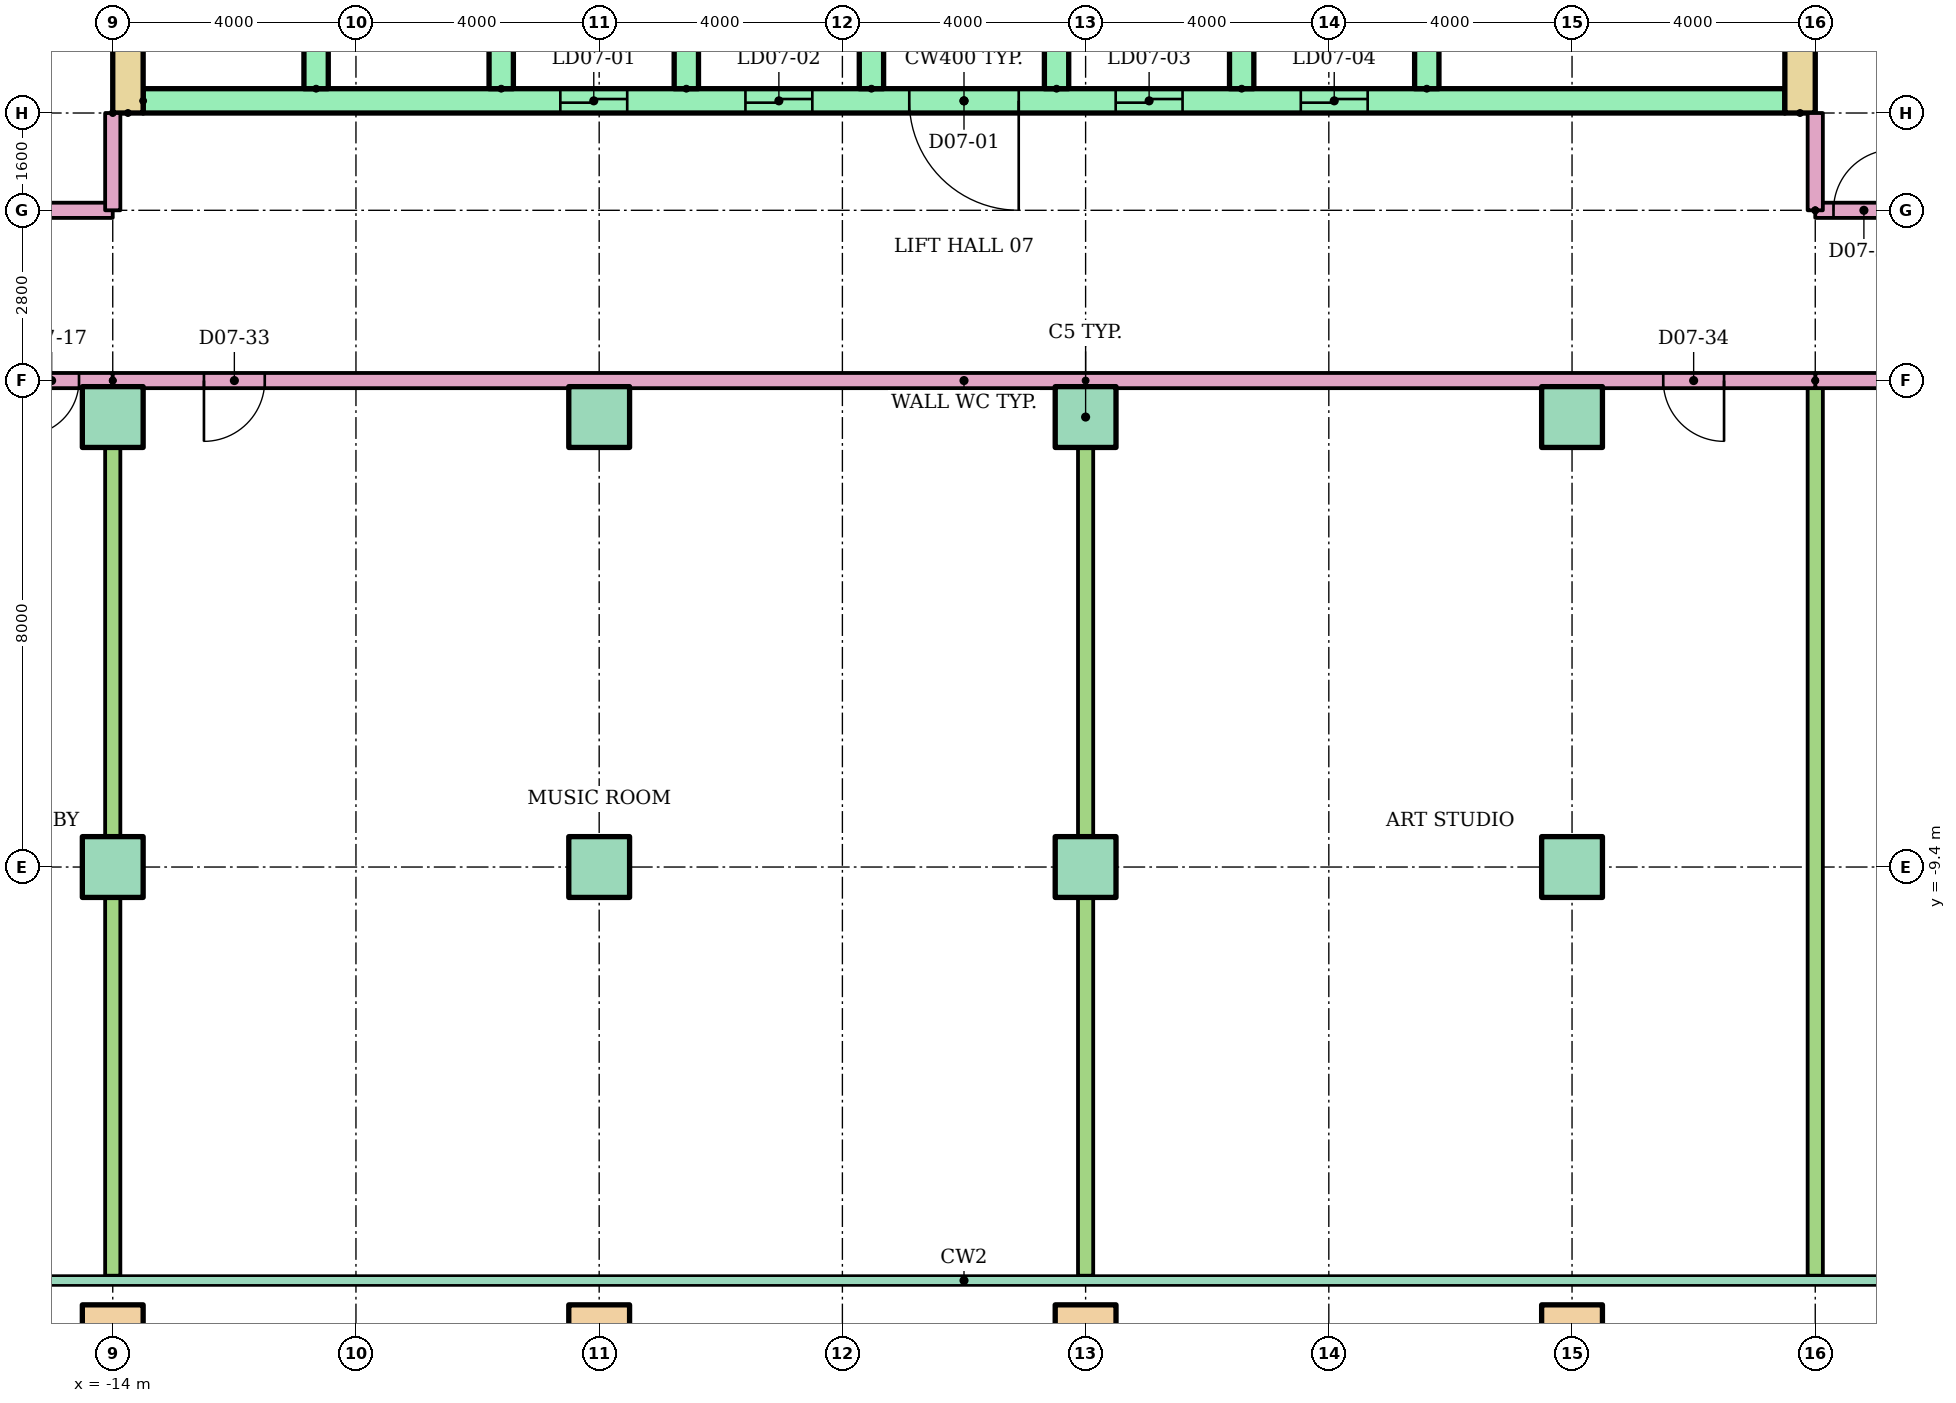
"""IFC4 building model, lengths in metres.
Left out: names, types, materials, properties, quantities, classifications, styles, units other than length and angle.
Written with IfcOpenShell. Run it as: python <this file> out.ifc"""

import sys

from ifc_helpers import new_model, si_unit, direction, frame, frame_2d, origin, origin_2d, place, context, subcontext, project, spatial, rectangle, hollow_rectangle, extrude, element, fill, save


model = new_model("IFC4")
c1 = context("Model", 3, precision=1e-05, world=origin(), true_north=direction((0.0, 1.0)))
c2 = subcontext(c1, "Body", "Model", "MODEL_VIEW")
j1 = project(units=[si_unit("LENGTHUNIT", "METRE"), si_unit("PLANEANGLEUNIT", "RADIAN")], contexts=[c1])
p1 = place(None, origin())
s1 = spatial("IfcSite", under=j1, at=p1, CompositionType="ELEMENT")
p2 = place(p1, origin())
s2 = spatial("IfcBuilding", under=s1, at=p2, CompositionType="ELEMENT")
p3 = place(p2, frame((0.0, 0.0, 29.9)))
s3 = spatial("IfcBuildingStorey", under=s2, at=p3, CompositionType="ELEMENT", Elevation=29.9)
for number, where in (
    (1, (-14.0, -17.1, 0.0)),
    (2, (-6.0, -17.1, 0.0)),
    (3, (2.0, -17.1, 0.0)),
    (4, (10.0, -17.1, 0.0)),
):
    element("IfcColumn", number, at=place(p3, frame(where)), inside=s3, PredefinedType="COLUMN", context=c2, shape_type="SweptSolid", body=[
        extrude(hollow_rectangle(XDim=1.0, YDim=1.0, WallThickness=0.05, at=origin_2d()), origin(), (0.0, 0.0, 1.0), 3.9),
    ])
for number, where in (
    (5, (-14.0, -9.4, 0.0)),
    (6, (-6.0, -9.4, 0.0)),
    (7, (2.0, -9.4, 0.0)),
    (8, (10.0, -9.4, 0.0)),
    (9, (-14.0, -2.0, 0.0)),
    (10, (-6.0, -2.0, 0.0)),
    (11, (2.0, -2.0, 0.0)),
    (12, (10.0, -2.0, 0.0)),
):
    element("IfcColumn", number, at=place(p3, frame(where)), inside=s3, PredefinedType="COLUMN", context=c2, shape_type="SweptSolid", body=[
        extrude(rectangle(XDim=1.0, YDim=1.0, at=origin_2d()), origin(), (0.0, 0.0, 1.0), 3.9),
    ])
for number, where, z_axis, x_axis in (
    (13, (-13.75, 3.0, 0.0), (0.0, 0.0, 1.0), (0.0, 1.0, 0.0)),
    (14, (13.75, 3.0, 0.0), (0.0, 0.0, 1.0), (0.0, 1.0, 0.0)),
):
    element("IfcWall", number, at=place(p3, frame(where, z_axis=z_axis, x_axis=x_axis)), inside=s3, PredefinedType="SHEAR", context=c2, shape_type="SweptSolid", body=[
        extrude(rectangle(XDim=17.0, YDim=0.5, at=frame_2d((8.5, 0.0))), origin(), (0.0, 0.0, 1.0), 3.6),
    ])
p4 = place(p3, frame((-13.5, 3.2, 0.0)))
e15 = element("IfcWall", 15, at=p4, inside=s3, PredefinedType="SHEAR", context=c2, shape_type="SweptSolid", body=[
    extrude(rectangle(XDim=27.0, YDim=0.4, at=frame_2d((13.5, 0.0))), origin(), (0.0, 0.0, 1.0), 3.6),
])
p5 = place(p4, frame((6.861, 0.0, 0.0)))
e16 = element("IfcOpeningElement", 16, at=p5, cuts=e15, PredefinedType="OPENING", context=c2, shape_type="SweptSolid", body=[
    extrude(rectangle(XDim=1.1, YDim=2.1, at=frame_2d((0.55, 1.05))), frame((0.0, 0.21, 0.0), z_axis=(0.0, -1.0, 0.0), x_axis=(1.0, 0.0, 0.0)), (0.0, 0.0, 1.0), 0.42),
])
p6 = place(p4, frame((9.906, 0.0, 0.0)))
e17 = element("IfcOpeningElement", 17, at=p6, cuts=e15, PredefinedType="OPENING", context=c2, shape_type="SweptSolid", body=[
    extrude(rectangle(XDim=1.1, YDim=2.1, at=frame_2d((0.55, 1.05))), frame((0.0, 0.21, 0.0), z_axis=(0.0, -1.0, 0.0), x_axis=(1.0, 0.0, 0.0)), (0.0, 0.0, 1.0), 0.42),
])
p7 = place(p4, frame((15.994, 0.0, 0.0)))
e18 = element("IfcOpeningElement", 18, at=p7, cuts=e15, PredefinedType="OPENING", context=c2, shape_type="SweptSolid", body=[
    extrude(rectangle(XDim=1.1, YDim=2.1, at=frame_2d((0.55, 1.05))), frame((0.0, 0.21, 0.0), z_axis=(0.0, -1.0, 0.0), x_axis=(1.0, 0.0, 0.0)), (0.0, 0.0, 1.0), 0.42),
])
p8 = place(p4, frame((19.039, 0.0, 0.0)))
e19 = element("IfcOpeningElement", 19, at=p8, cuts=e15, PredefinedType="OPENING", context=c2, shape_type="SweptSolid", body=[
    extrude(rectangle(XDim=1.1, YDim=2.1, at=frame_2d((0.55, 1.05))), frame((0.0, 0.21, 0.0), z_axis=(0.0, -1.0, 0.0), x_axis=(1.0, 0.0, 0.0)), (0.0, 0.0, 1.0), 0.42),
])
p9 = place(p4, frame((12.6, 0.0, 0.0)))
e20 = element("IfcOpeningElement", 20, at=p9, cuts=e15, PredefinedType="OPENING", context=c2, shape_type="SweptSolid", body=[
    extrude(rectangle(XDim=1.8, YDim=2.1, at=frame_2d((0.9, 1.05))), frame((0.0, 0.21, 0.0), z_axis=(0.0, -1.0, 0.0), x_axis=(1.0, 0.0, 0.0)), (0.0, 0.0, 1.0), 0.42),
])
for number, where, z_axis, x_axis in (
    (21, (-10.656, 3.4, 0.0), (0.0, 0.0, 1.0), (0.0, 1.0, 0.0)),
    (22, (-7.611, 3.4, 0.0), (0.0, 0.0, 1.0), (0.0, 1.0, 0.0)),
    (23, (-4.567, 3.4, 0.0), (0.0, 0.0, 1.0), (0.0, 1.0, 0.0)),
    (24, (-1.522, 3.4, 0.0), (0.0, 0.0, 1.0), (0.0, 1.0, 0.0)),
    (25, (1.522, 3.4, 0.0), (0.0, 0.0, 1.0), (0.0, 1.0, 0.0)),
    (26, (4.567, 3.4, 0.0), (0.0, 0.0, 1.0), (0.0, 1.0, 0.0)),
    (27, (7.611, 3.4, 0.0), (0.0, 0.0, 1.0), (0.0, 1.0, 0.0)),
):
    element("IfcWall", number, at=place(p3, frame(where, z_axis=z_axis, x_axis=x_axis)), inside=s3, PredefinedType="SHEAR", context=c2, shape_type="SweptSolid", body=[
        extrude(rectangle(XDim=3.0, YDim=0.4, at=frame_2d((1.5, 0.0))), origin(), (0.0, 0.0, 1.0), 3.6),
    ])
p10 = place(p3, frame((-14.0, -1.4, 0.0), z_axis=(0.0, 0.0, 1.0), x_axis=(-1.0, 0.0, 0.0)))
e28 = element("IfcWall", 28, at=p10, inside=s3, PredefinedType="PARTITIONING", context=c2, shape_type="SweptSolid", body=[
    extrude(rectangle(XDim=15.0, YDim=0.25, at=frame_2d((7.5, 0.0))), origin(), (0.0, 0.0, 1.0), 3.1),
])
p11 = place(p10, frame((0.555, 0.0, 0.0)))
e29 = element("IfcOpeningElement", 29, at=p11, cuts=e28, PredefinedType="OPENING", context=c2, shape_type="SweptSolid", body=[
    extrude(rectangle(XDim=0.9, YDim=2.1, at=frame_2d((0.45, 1.05))), frame((0.0, 0.135, 0.0), z_axis=(0.0, -1.0, 0.0), x_axis=(1.0, 0.0, 0.0)), (0.0, 0.0, 1.0), 0.27),
])
p12 = place(p10, frame((5.5, 0.0, 0.0)))
e30 = element("IfcOpeningElement", 30, at=p12, cuts=e28, PredefinedType="OPENING", context=c2, shape_type="SweptSolid", body=[
    extrude(rectangle(XDim=1.0, YDim=2.1, at=frame_2d((0.5, 1.05))), frame((0.0, 0.135, 0.0), z_axis=(0.0, -1.0, 0.0), x_axis=(1.0, 0.0, 0.0)), (0.0, 0.0, 1.0), 0.27),
])
p13 = place(p10, frame((13.5, 0.0, 0.0)))
e31 = element("IfcOpeningElement", 31, at=p13, cuts=e28, PredefinedType="OPENING", context=c2, shape_type="SweptSolid", body=[
    extrude(rectangle(XDim=1.0, YDim=2.1, at=frame_2d((0.5, 1.05))), frame((0.0, 0.135, 0.0), z_axis=(0.0, -1.0, 0.0), x_axis=(1.0, 0.0, 0.0)), (0.0, 0.0, 1.0), 0.27),
])
p14 = place(p3, frame((-14.0, -1.4, 0.0), z_axis=(0.0, 0.0, 1.0), x_axis=(0.0, -1.0, 0.0)))
e32 = element("IfcWall", 32, at=p14, inside=s3, PredefinedType="PARTITIONING", context=c2, shape_type="SweptSolid", body=[
    extrude(rectangle(XDim=14.721, YDim=0.25, at=frame_2d((7.361, 0.0))), origin(), (0.0, 0.0, 1.0), 3.1),
])
p15 = place(p3, frame((-29.0, 1.4, 0.0)))
e33 = element("IfcWall", 33, at=p15, inside=s3, PredefinedType="PARTITIONING", context=c2, shape_type="SweptSolid", body=[
    extrude(rectangle(XDim=15.0, YDim=0.25, at=frame_2d((7.5, 0.0))), origin(), (0.0, 0.0, 1.0), 3.1),
])
p16 = place(p15, frame((12.5, 0.0, 0.0)))
e34 = element("IfcOpeningElement", 34, at=p16, cuts=e33, PredefinedType="OPENING", context=c2, shape_type="SweptSolid", body=[
    extrude(rectangle(XDim=1.0, YDim=2.1, at=frame_2d((0.5, 1.05))), frame((0.0, 0.135, 0.0), z_axis=(0.0, -1.0, 0.0), x_axis=(1.0, 0.0, 0.0)), (0.0, 0.0, 1.0), 0.27),
])
p17 = place(p15, frame((4.5, 0.0, 0.0)))
e35 = element("IfcOpeningElement", 35, at=p17, cuts=e33, PredefinedType="OPENING", context=c2, shape_type="SweptSolid", body=[
    extrude(rectangle(XDim=1.0, YDim=2.1, at=frame_2d((0.5, 1.05))), frame((0.0, 0.135, 0.0), z_axis=(0.0, -1.0, 0.0), x_axis=(1.0, 0.0, 0.0)), (0.0, 0.0, 1.0), 0.27),
])
p18 = place(p3, frame((29.0, -1.4, 0.0), z_axis=(0.0, 0.0, 1.0), x_axis=(-1.0, 0.0, 0.0)))
e36 = element("IfcWall", 36, at=p18, inside=s3, PredefinedType="PARTITIONING", context=c2, shape_type="SweptSolid", body=[
    extrude(rectangle(XDim=15.0, YDim=0.25, at=frame_2d((7.5, 0.0))), origin(), (0.0, 0.0, 1.0), 3.1),
])
p19 = place(p18, frame((12.5, 0.0, 0.0)))
e37 = element("IfcOpeningElement", 37, at=p19, cuts=e36, PredefinedType="OPENING", context=c2, shape_type="SweptSolid", body=[
    extrude(rectangle(XDim=1.0, YDim=2.1, at=frame_2d((0.5, 1.05))), frame((0.0, 0.135, 0.0), z_axis=(0.0, -1.0, 0.0), x_axis=(1.0, 0.0, 0.0)), (0.0, 0.0, 1.0), 0.27),
])
p20 = place(p18, frame((4.5, 0.0, 0.0)))
e38 = element("IfcOpeningElement", 38, at=p20, cuts=e36, PredefinedType="OPENING", context=c2, shape_type="SweptSolid", body=[
    extrude(rectangle(XDim=1.0, YDim=2.1, at=frame_2d((0.5, 1.05))), frame((0.0, 0.135, 0.0), z_axis=(0.0, -1.0, 0.0), x_axis=(1.0, 0.0, 0.0)), (0.0, 0.0, 1.0), 0.27),
])
p21 = place(p3, frame((14.0, -1.4, 0.0), z_axis=(0.0, 0.0, 1.0), x_axis=(0.0, -1.0, 0.0)))
e39 = element("IfcWall", 39, at=p21, inside=s3, PredefinedType="PARTITIONING", context=c2, shape_type="SweptSolid", body=[
    extrude(rectangle(XDim=14.721, YDim=0.25, at=frame_2d((7.361, 0.0))), origin(), (0.0, 0.0, 1.0), 3.1),
])
p22 = place(p3, frame((14.0, 1.4, 0.0)))
e40 = element("IfcWall", 40, at=p22, inside=s3, PredefinedType="PARTITIONING", context=c2, shape_type="SweptSolid", body=[
    extrude(rectangle(XDim=15.0, YDim=0.25, at=frame_2d((7.5, 0.0))), origin(), (0.0, 0.0, 1.0), 3.1),
])
p23 = place(p22, frame((0.3, 0.0, 0.0)))
e41 = element("IfcOpeningElement", 41, at=p23, cuts=e40, PredefinedType="OPENING", context=c2, shape_type="SweptSolid", body=[
    extrude(rectangle(XDim=1.0, YDim=2.1, at=frame_2d((0.5, 1.05))), frame((0.0, 0.135, 0.0), z_axis=(0.0, -1.0, 0.0), x_axis=(1.0, 0.0, 0.0)), (0.0, 0.0, 1.0), 0.27),
])
p24 = place(p22, frame((5.5, 0.0, 0.0)))
e42 = element("IfcOpeningElement", 42, at=p24, cuts=e40, PredefinedType="OPENING", context=c2, shape_type="SweptSolid", body=[
    extrude(rectangle(XDim=1.0, YDim=2.1, at=frame_2d((0.5, 1.05))), frame((0.0, 0.135, 0.0), z_axis=(0.0, -1.0, 0.0), x_axis=(1.0, 0.0, 0.0)), (0.0, 0.0, 1.0), 0.27),
])
p25 = place(p22, frame((13.5, 0.0, 0.0)))
e43 = element("IfcOpeningElement", 43, at=p25, cuts=e40, PredefinedType="OPENING", context=c2, shape_type="SweptSolid", body=[
    extrude(rectangle(XDim=1.0, YDim=2.1, at=frame_2d((0.5, 1.05))), frame((0.0, 0.135, 0.0), z_axis=(0.0, -1.0, 0.0), x_axis=(1.0, 0.0, 0.0)), (0.0, 0.0, 1.0), 0.27),
])
p26 = place(p3, frame((2.0, -1.4, 0.0), z_axis=(0.0, 0.0, 1.0), x_axis=(0.0, -1.0, 0.0)))
e44 = element("IfcWall", 44, at=p26, inside=s3, PredefinedType="PARTITIONING", context=c2, shape_type="SweptSolid", body=[
    extrude(rectangle(XDim=14.721, YDim=0.25, at=frame_2d((7.361, 0.0))), origin(), (0.0, 0.0, 1.0), 3.1),
])
p27 = place(p3, frame((14.0, -1.4, 0.0), z_axis=(0.0, 0.0, 1.0), x_axis=(-1.0, 0.0, 0.0)))
e45 = element("IfcWall", 45, at=p27, inside=s3, PredefinedType="PARTITIONING", context=c2, shape_type="SweptSolid", body=[
    extrude(rectangle(XDim=28.0, YDim=0.25, at=frame_2d((14.0, 0.0))), origin(), (0.0, 0.0, 1.0), 3.1),
])
p28 = place(p27, frame((25.5, 0.0, 0.0)))
e46 = element("IfcOpeningElement", 46, at=p28, cuts=e45, PredefinedType="OPENING", context=c2, shape_type="SweptSolid", body=[
    extrude(rectangle(XDim=1.0, YDim=2.1, at=frame_2d((0.5, 1.05))), frame((0.0, 0.135, 0.0), z_axis=(0.0, -1.0, 0.0), x_axis=(1.0, 0.0, 0.0)), (0.0, 0.0, 1.0), 0.27),
])
p29 = place(p27, frame((1.5, 0.0, 0.0)))
e47 = element("IfcOpeningElement", 47, at=p29, cuts=e45, PredefinedType="OPENING", context=c2, shape_type="SweptSolid", body=[
    extrude(rectangle(XDim=1.0, YDim=2.1, at=frame_2d((0.5, 1.05))), frame((0.0, 0.135, 0.0), z_axis=(0.0, -1.0, 0.0), x_axis=(1.0, 0.0, 0.0)), (0.0, 0.0, 1.0), 0.27),
])
for number, where, z_axis, x_axis in (
    (48, (-14.0, 3.0, 0.0), (0.0, 0.0, 1.0), (0.0, -1.0, 0.0)),
    (49, (14.0, 1.4, 0.0), (0.0, 0.0, 1.0), (0.0, 1.0, 0.0)),
):
    element("IfcWall", number, at=place(p3, frame(where, z_axis=z_axis, x_axis=x_axis)), inside=s3, PredefinedType="PARTITIONING", context=c2, shape_type="SweptSolid", body=[
        extrude(rectangle(XDim=1.6, YDim=0.25, at=frame_2d((0.8, 0.0))), origin(), (0.0, 0.0, 1.0), 3.1),
    ])
p30 = place(p5, origin())
e50 = element("IfcDoor", 50, at=p30, inside=s3, OperationType="SLIDING_TO_LEFT", PredefinedType="DOOR", context=c2, shape_type="SweptSolid", body=[
    extrude(rectangle(XDim=1.1, YDim=2.1, at=frame_2d((0.55, 1.05))), frame((0.0, 0.025, 0.0), z_axis=(0.0, -1.0, 0.0), x_axis=(1.0, 0.0, 0.0)), (0.0, 0.0, 1.0), 0.05),
])
fill(e16, e50)
p31 = place(p6, origin())
e51 = element("IfcDoor", 51, at=p31, inside=s3, OperationType="SLIDING_TO_LEFT", PredefinedType="DOOR", context=c2, shape_type="SweptSolid", body=[
    extrude(rectangle(XDim=1.1, YDim=2.1, at=frame_2d((0.55, 1.05))), frame((0.0, 0.025, 0.0), z_axis=(0.0, -1.0, 0.0), x_axis=(1.0, 0.0, 0.0)), (0.0, 0.0, 1.0), 0.05),
])
fill(e17, e51)
p32 = place(p7, origin())
e52 = element("IfcDoor", 52, at=p32, inside=s3, OperationType="SLIDING_TO_LEFT", PredefinedType="DOOR", context=c2, shape_type="SweptSolid", body=[
    extrude(rectangle(XDim=1.1, YDim=2.1, at=frame_2d((0.55, 1.05))), frame((0.0, 0.025, 0.0), z_axis=(0.0, -1.0, 0.0), x_axis=(1.0, 0.0, 0.0)), (0.0, 0.0, 1.0), 0.05),
])
fill(e18, e52)
p33 = place(p8, origin())
e53 = element("IfcDoor", 53, at=p33, inside=s3, OperationType="SLIDING_TO_LEFT", PredefinedType="DOOR", context=c2, shape_type="SweptSolid", body=[
    extrude(rectangle(XDim=1.1, YDim=2.1, at=frame_2d((0.55, 1.05))), frame((0.0, 0.025, 0.0), z_axis=(0.0, -1.0, 0.0), x_axis=(1.0, 0.0, 0.0)), (0.0, 0.0, 1.0), 0.05),
])
fill(e19, e53)
p34 = place(p9, frame((1.8, 0.0, 0.0), z_axis=(0.0, 0.0, 1.0), x_axis=(-1.0, 0.0, 0.0)))
e54 = element("IfcDoor", 54, at=p34, inside=s3, OperationType="DOUBLE_DOOR_SINGLE_SWING", PredefinedType="DOOR", context=c2, shape_type="SweptSolid", body=[
    extrude(rectangle(XDim=1.8, YDim=2.1, at=frame_2d((0.9, 1.05))), frame((0.0, 0.025, 0.0), z_axis=(0.0, -1.0, 0.0), x_axis=(1.0, 0.0, 0.0)), (0.0, 0.0, 1.0), 0.05),
])
fill(e20, e54)
p35 = place(p11, origin())
e55 = element("IfcDoor", 55, at=p35, inside=s3, OperationType="SINGLE_SWING_RIGHT", PredefinedType="DOOR", context=c2, shape_type="SweptSolid", body=[
    extrude(rectangle(XDim=0.9, YDim=2.1, at=frame_2d((0.45, 1.05))), frame((0.0, 0.025, 0.0), z_axis=(0.0, -1.0, 0.0), x_axis=(1.0, 0.0, 0.0)), (0.0, 0.0, 1.0), 0.05),
])
fill(e29, e55)
p36 = place(p23, origin())
e56 = element("IfcDoor", 56, at=p36, inside=s3, OperationType="SINGLE_SWING_RIGHT", PredefinedType="DOOR", context=c2, shape_type="SweptSolid", body=[
    extrude(rectangle(XDim=1.0, YDim=2.1, at=frame_2d((0.5, 1.05))), frame((0.0, 0.025, 0.0), z_axis=(0.0, -1.0, 0.0), x_axis=(1.0, 0.0, 0.0)), (0.0, 0.0, 1.0), 0.05),
])
fill(e41, e56)
p37 = place(p28, origin())
e57 = element("IfcDoor", 57, at=p37, inside=s3, OperationType="SINGLE_SWING_RIGHT", PredefinedType="DOOR", context=c2, shape_type="SweptSolid", body=[
    extrude(rectangle(XDim=1.0, YDim=2.1, at=frame_2d((0.5, 1.05))), frame((0.0, 0.025, 0.0), z_axis=(0.0, -1.0, 0.0), x_axis=(1.0, 0.0, 0.0)), (0.0, 0.0, 1.0), 0.05),
])
fill(e46, e57)
p38 = place(p29, origin())
e58 = element("IfcDoor", 58, at=p38, inside=s3, OperationType="SINGLE_SWING_LEFT", PredefinedType="DOOR", context=c2, shape_type="SweptSolid", body=[
    extrude(rectangle(XDim=1.0, YDim=2.1, at=frame_2d((0.5, 1.05))), frame((0.0, 0.025, 0.0), z_axis=(0.0, -1.0, 0.0), x_axis=(1.0, 0.0, 0.0)), (0.0, 0.0, 1.0), 0.05),
])
fill(e47, e58)
save(model, sys.argv[1])
